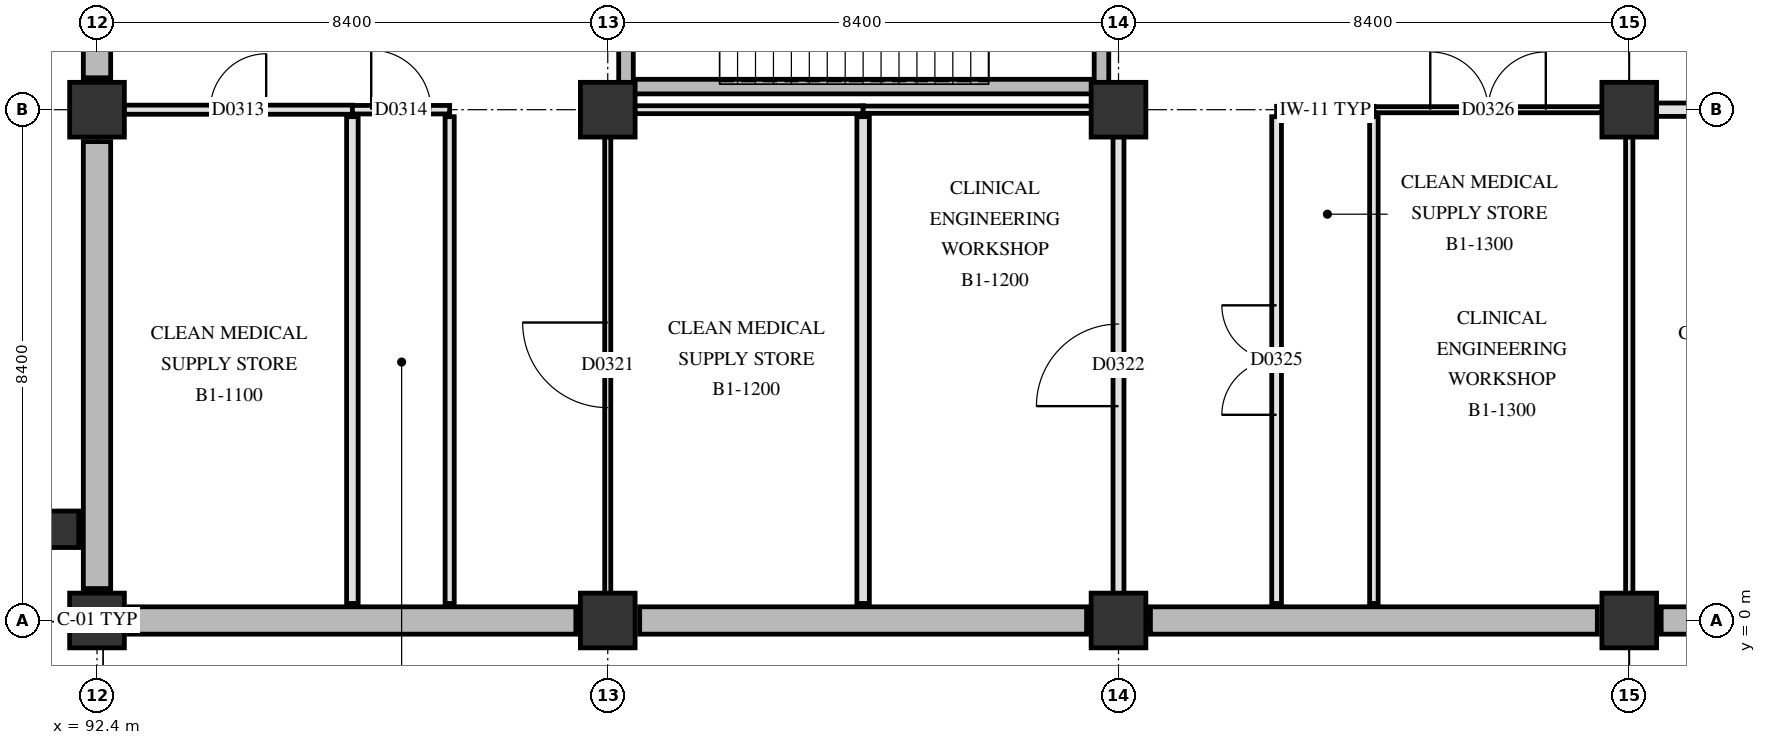
"""IFC4 building model, lengths in metres.
Left out: names, types, materials, properties, quantities, classifications, styles, units other than length and angle.
Written with IfcOpenShell. Run it as: python <this file> out.ifc"""

import sys

from ifc_helpers import new_model, si_unit, direction, frame, frame_2d, origin, origin_2d, place, context, subcontext, project, spatial, rectangle, extrude, element, fill, save


model = new_model("IFC4")
c1 = context("Model", 3, precision=1e-05, world=origin(), true_north=direction((0.0, 1.0)))
c2 = subcontext(c1, "Body", "Model", "MODEL_VIEW")
j1 = project(units=[si_unit("LENGTHUNIT", "METRE"), si_unit("PLANEANGLEUNIT", "RADIAN")], contexts=[c1])
p1 = place(None, origin())
s1 = spatial("IfcSite", under=j1, at=p1, CompositionType="ELEMENT")
p2 = place(p1, origin())
s2 = spatial("IfcBuilding", under=s1, at=p2, CompositionType="ELEMENT")
p3 = place(p2, frame((0.0, 0.0, -5.4)))
s3 = spatial("IfcBuildingStorey", under=s2, at=p3, CompositionType="ELEMENT", Elevation=-5.4)
for number, where, z_axis, x_axis in (
    (1, (92.4, 0.0, 0.0), (0.0, 0.0, 1.0), (1.0, 0.0, 0.0)),
    (2, (92.4, 8.4, 0.0), (0.0, 0.0, 1.0), (1.0, 0.0, 0.0)),
    (3, (100.8, 0.0, 0.0), (0.0, 0.0, 1.0), (1.0, 0.0, 0.0)),
    (4, (100.8, 8.4, 0.0), (0.0, 0.0, 1.0), (1.0, 0.0, 0.0)),
    (5, (109.2, 0.0, 0.0), (0.0, 0.0, 1.0), (1.0, 0.0, 0.0)),
    (6, (109.2, 8.4, 0.0), (0.0, 0.0, 1.0), (1.0, 0.0, 0.0)),
    (7, (117.6, 0.0, 0.0), (0.0, 0.0, 1.0), (1.0, 0.0, 0.0)),
    (8, (117.6, 8.4, 0.0), (0.0, 0.0, 1.0), (1.0, 0.0, 0.0)),
):
    element("IfcColumn", number, at=place(p3, frame(where, z_axis=z_axis, x_axis=x_axis)), inside=s3, PredefinedType="COLUMN", context=c2, shape_type="SweptSolid", body=[
        extrude(rectangle(XDim=0.9, YDim=0.9, at=origin_2d()), origin(), (0.0, 0.0, 1.0), 5.4),
    ])
p4 = place(p3, frame((125.475, 0.0, 0.0), z_axis=(0.0, 0.0, 1.0), x_axis=(-1.0, 0.0, 0.0)))
e9 = element("IfcWall", 9, at=p4, inside=s3, PredefinedType="SOLIDWALL", context=c2, shape_type="SweptSolid", body=[
    extrude(rectangle(XDim=7.35, YDim=0.45, at=frame_2d((3.675, 0.0))), origin(), (0.0, 0.0, 1.0), 5.08),
])
p5 = place(p3, frame((117.075, 0.0, 0.0), z_axis=(0.0, 0.0, 1.0), x_axis=(-1.0, 0.0, 0.0)))
e10 = element("IfcWall", 10, at=p5, inside=s3, PredefinedType="SOLIDWALL", context=c2, shape_type="SweptSolid", body=[
    extrude(rectangle(XDim=7.35, YDim=0.45, at=frame_2d((3.675, 0.0))), origin(), (0.0, 0.0, 1.0), 5.08),
])
p6 = place(p3, frame((108.675, 0.0, 0.0), z_axis=(0.0, 0.0, 1.0), x_axis=(-1.0, 0.0, 0.0)))
e11 = element("IfcWall", 11, at=p6, inside=s3, PredefinedType="SOLIDWALL", context=c2, shape_type="SweptSolid", body=[
    extrude(rectangle(XDim=7.35, YDim=0.45, at=frame_2d((3.675, 0.0))), origin(), (0.0, 0.0, 1.0), 5.08),
])
p7 = place(p3, frame((100.275, 0.0, 0.0), z_axis=(0.0, 0.0, 1.0), x_axis=(-1.0, 0.0, 0.0)))
e12 = element("IfcWall", 12, at=p7, inside=s3, PredefinedType="SOLIDWALL", context=c2, shape_type="SweptSolid", body=[
    extrude(rectangle(XDim=7.35, YDim=0.45, at=frame_2d((3.675, 0.0))), origin(), (0.0, 0.0, 1.0), 5.08),
])
p8 = place(p3, frame((92.4, 0.525, 0.0), z_axis=(0.0, 0.0, 1.0), x_axis=(0.0, 1.0, 0.0)))
e13 = element("IfcWall", 13, at=p8, inside=s3, PredefinedType="SOLIDWALL", context=c2, shape_type="SweptSolid", body=[
    extrude(rectangle(XDim=7.35, YDim=0.45, at=frame_2d((3.675, 0.0))), origin(), (0.0, 0.0, 1.0), 5.08),
])
p9 = place(p3, frame((92.4, 8.925, 0.0), z_axis=(0.0, 0.0, 1.0), x_axis=(0.0, 1.0, 0.0)))
e14 = element("IfcWall", 14, at=p9, inside=s3, PredefinedType="SOLIDWALL", context=c2, shape_type="SweptSolid", body=[
    extrude(rectangle(XDim=7.35, YDim=0.45, at=frame_2d((3.675, 0.0))), origin(), (0.0, 0.0, 1.0), 5.08),
])
p10 = place(p3, frame((91.8, 1.5, 0.0), z_axis=(0.0, 0.0, 1.0), x_axis=(1.0, 0.0, 0.0)))
e15 = element("IfcColumn", 15, at=p10, inside=s3, PredefinedType="COLUMN", context=c2, shape_type="SweptSolid", body=[
    extrude(rectangle(XDim=0.6, YDim=0.6, at=origin_2d()), origin(), (0.0, 0.0, 1.0), 4.0),
])
p11 = place(p3, frame((101.1, 8.78, 0.0), z_axis=(0.0, 0.0, 1.0), x_axis=(1.0, 0.0, 0.0)))
e16 = element("IfcWall", 16, at=p11, inside=s3, PredefinedType="SHEAR", context=c2, shape_type="SweptSolid", body=[
    extrude(rectangle(XDim=7.82, YDim=0.24, at=frame_2d((3.91, 0.0))), origin(), (0.0, 0.0, 1.0), 5.08),
])
for number, where, z_axis, x_axis in (
    (17, (101.1, 8.78, 0.0), (0.0, 0.0, 1.0), (0.0, 1.0, 0.0)),
    (18, (108.92, 8.78, 0.0), (0.0, 0.0, 1.0), (0.0, 1.0, 0.0)),
):
    element("IfcWall", number, at=place(p3, frame(where, z_axis=z_axis, x_axis=x_axis)), inside=s3, PredefinedType="SHEAR", context=c2, shape_type="SweptSolid", body=[
        extrude(rectangle(XDim=3.32, YDim=0.24, at=frame_2d((1.66, 0.0))), origin(), (0.0, 0.0, 1.0), 5.08),
    ])
p12 = place(p3, frame((92.845, 8.4, 0.0), z_axis=(0.0, 0.0, 1.0), x_axis=(1.0, 0.0, 0.0)))
e19 = element("IfcWall", 19, at=p12, inside=s3, PredefinedType="PARTITIONING", context=c2, shape_type="SweptSolid", body=[
    extrude(rectangle(XDim=3.755, YDim=0.15, at=frame_2d((1.877, 0.0))), origin(), (0.0, 0.0, 1.0), 4.42),
])
p13 = place(p12, frame((1.417, 0.0, 0.0)))
e20 = element("IfcOpeningElement", 20, at=p13, cuts=e19, PredefinedType="OPENING", context=c2, shape_type="SweptSolid", body=[
    extrude(rectangle(XDim=0.92, YDim=2.08, at=frame_2d((0.46, 1.04))), frame((0.0, 0.085, 0.0), z_axis=(0.0, -1.0, 0.0), x_axis=(1.0, 0.0, 0.0)), (0.0, 0.0, 1.0), 0.17),
])
p14 = place(p3, frame((96.6, 8.4, 0.0), z_axis=(0.0, 0.0, 1.0), x_axis=(1.0, 0.0, 0.0)))
e21 = element("IfcWall", 21, at=p14, inside=s3, PredefinedType="PARTITIONING", context=c2, shape_type="SweptSolid", body=[
    extrude(rectangle(XDim=1.6, YDim=0.14, at=frame_2d((0.8, 0.0))), origin(), (0.0, 0.0, 1.0), 4.42),
])
p15 = place(p14, frame((0.31, 0.0, 0.0)))
e22 = element("IfcOpeningElement", 22, at=p15, cuts=e21, PredefinedType="OPENING", context=c2, shape_type="SweptSolid", body=[
    extrude(rectangle(XDim=0.98, YDim=2.12, at=frame_2d((0.49, 1.06))), frame((0.0, 0.08, 0.0), z_axis=(0.0, -1.0, 0.0), x_axis=(1.0, 0.0, 0.0)), (0.0, 0.0, 1.0), 0.16),
])
p16 = place(p3, frame((101.245, 8.4, 0.0), z_axis=(0.0, 0.0, 1.0), x_axis=(1.0, 0.0, 0.0)))
e23 = element("IfcWall", 23, at=p16, inside=s3, PredefinedType="PARTITIONING", context=c2, shape_type="SweptSolid", body=[
    extrude(rectangle(XDim=3.755, YDim=0.13, at=frame_2d((1.877, 0.0))), origin(), (0.0, 0.0, 1.0), 4.42),
])
p17 = place(p3, frame((105.0, 8.4, 0.0), z_axis=(0.0, 0.0, 1.0), x_axis=(1.0, 0.0, 0.0)))
e24 = element("IfcWall", 24, at=p17, inside=s3, PredefinedType="PARTITIONING", context=c2, shape_type="SweptSolid", body=[
    extrude(rectangle(XDim=3.755, YDim=0.12, at=frame_2d((1.877, 0.0))), origin(), (0.0, 0.0, 1.0), 4.42),
])
p18 = place(p3, frame((111.8, 8.4, 0.0), z_axis=(0.0, 0.0, 1.0), x_axis=(1.0, 0.0, 0.0)))
e25 = element("IfcWall", 25, at=p18, inside=s3, PredefinedType="PARTITIONING", context=c2, shape_type="SweptSolid", body=[
    extrude(rectangle(XDim=1.6, YDim=0.112, at=frame_2d((0.8, 0.0))), origin(), (0.0, 0.0, 1.0), 4.42),
])
p19 = place(p3, frame((113.4, 8.4, 0.0), z_axis=(0.0, 0.0, 1.0), x_axis=(1.0, 0.0, 0.0)))
e26 = element("IfcWall", 26, at=p19, inside=s3, PredefinedType="PARTITIONING", context=c2, shape_type="SweptSolid", body=[
    extrude(rectangle(XDim=3.755, YDim=0.1, at=frame_2d((1.877, 0.0))), origin(), (0.0, 0.0, 1.0), 4.42),
])
p20 = place(p19, frame((0.927, 0.0, 0.0)))
e27 = element("IfcOpeningElement", 27, at=p20, cuts=e26, PredefinedType="OPENING", context=c2, shape_type="SweptSolid", body=[
    extrude(rectangle(XDim=1.9, YDim=2.3, at=frame_2d((0.95, 1.15))), frame((0.0, 0.06, 0.0), z_axis=(0.0, -1.0, 0.0), x_axis=(1.0, 0.0, 0.0)), (0.0, 0.0, 1.0), 0.12),
])
p21 = place(p3, frame((118.045, 8.4, 0.0), z_axis=(0.0, 0.0, 1.0), x_axis=(1.0, 0.0, 0.0)))
e28 = element("IfcWall", 28, at=p21, inside=s3, PredefinedType="PARTITIONING", context=c2, shape_type="SweptSolid", body=[
    extrude(rectangle(XDim=3.755, YDim=0.22, at=frame_2d((1.877, 0.0))), origin(), (0.0, 0.0, 1.0), 4.42),
])
p22 = place(p21, frame((1.353, 0.0, 0.0)))
e29 = element("IfcOpeningElement", 29, at=p22, cuts=e28, PredefinedType="OPENING", context=c2, shape_type="SweptSolid", body=[
    extrude(rectangle(XDim=1.05, YDim=2.15, at=frame_2d((0.525, 1.075))), frame((0.0, 0.12, 0.0), z_axis=(0.0, -1.0, 0.0), x_axis=(1.0, 0.0, 0.0)), (0.0, 0.0, 1.0), 0.24),
])
p23 = place(p3, frame((96.6, 0.28, 0.0), z_axis=(0.0, 0.0, 1.0), x_axis=(0.0, 1.0, 0.0)))
e30 = element("IfcWall", 30, at=p23, inside=s3, PredefinedType="PARTITIONING", context=c2, shape_type="SweptSolid", body=[
    extrude(rectangle(XDim=8.005, YDim=0.19, at=frame_2d((4.002, 0.0))), origin(), (0.0, 0.0, 1.0), 4.42),
])
p24 = place(p3, frame((98.2, 0.28, 0.0), z_axis=(0.0, 0.0, 1.0), x_axis=(0.0, 1.0, 0.0)))
e31 = element("IfcWall", 31, at=p24, inside=s3, PredefinedType="PARTITIONING", context=c2, shape_type="SweptSolid", body=[
    extrude(rectangle(XDim=8.005, YDim=0.15, at=frame_2d((4.002, 0.0))), origin(), (0.0, 0.0, 1.0), 4.42),
])
p25 = place(p3, frame((100.8, 0.445, 0.0), z_axis=(0.0, 0.0, 1.0), x_axis=(0.0, 1.0, 0.0)))
e32 = element("IfcWall", 32, at=p25, inside=s3, PredefinedType="PARTITIONING", context=c2, shape_type="SweptSolid", body=[
    extrude(rectangle(XDim=7.51, YDim=0.1, at=frame_2d((3.755, 0.0))), origin(), (0.0, 0.0, 1.0), 4.47),
])
p26 = place(p25, frame((3.055, 0.0, 0.0)))
e33 = element("IfcOpeningElement", 33, at=p26, cuts=e32, PredefinedType="OPENING", context=c2, shape_type="SweptSolid", body=[
    extrude(rectangle(XDim=1.4, YDim=2.2, at=frame_2d((0.7, 1.1))), frame((0.0, 0.06, 0.0), z_axis=(0.0, -1.0, 0.0), x_axis=(1.0, 0.0, 0.0)), (0.0, 0.0, 1.0), 0.12),
])
p27 = place(p3, frame((105.0, 0.28, 0.0), z_axis=(0.0, 0.0, 1.0), x_axis=(0.0, 1.0, 0.0)))
e34 = element("IfcWall", 34, at=p27, inside=s3, PredefinedType="PARTITIONING", context=c2, shape_type="SweptSolid", body=[
    extrude(rectangle(XDim=8.005, YDim=0.205, at=frame_2d((4.002, 0.0))), origin(), (0.0, 0.0, 1.0), 4.42),
])
p28 = place(p3, frame((109.2, 0.445, 0.0), z_axis=(0.0, 0.0, 1.0), x_axis=(0.0, 1.0, 0.0)))
e35 = element("IfcWall", 35, at=p28, inside=s3, PredefinedType="PARTITIONING", context=c2, shape_type="SweptSolid", body=[
    extrude(rectangle(XDim=7.51, YDim=0.18, at=frame_2d((3.755, 0.0))), origin(), (0.0, 0.0, 1.0), 4.47),
])
p29 = place(p28, frame((3.08, 0.0, 0.0)))
e36 = element("IfcOpeningElement", 36, at=p29, cuts=e35, PredefinedType="OPENING", context=c2, shape_type="SweptSolid", body=[
    extrude(rectangle(XDim=1.35, YDim=2.2, at=frame_2d((0.675, 1.1))), frame((0.0, 0.1, 0.0), z_axis=(0.0, -1.0, 0.0), x_axis=(1.0, 0.0, 0.0)), (0.0, 0.0, 1.0), 0.2),
])
p30 = place(p3, frame((111.8, 0.28, 0.0), z_axis=(0.0, 0.0, 1.0), x_axis=(0.0, 1.0, 0.0)))
e37 = element("IfcWall", 37, at=p30, inside=s3, PredefinedType="PARTITIONING", context=c2, shape_type="SweptSolid", body=[
    extrude(rectangle(XDim=8.005, YDim=0.16, at=frame_2d((4.002, 0.0))), origin(), (0.0, 0.0, 1.0), 4.42),
])
p31 = place(p30, frame((3.103, 0.0, 0.0)))
e38 = element("IfcOpeningElement", 38, at=p31, cuts=e37, PredefinedType="OPENING", context=c2, shape_type="SweptSolid", body=[
    extrude(rectangle(XDim=1.8, YDim=2.25, at=frame_2d((0.9, 1.125))), frame((0.0, 0.09, 0.0), z_axis=(0.0, -1.0, 0.0), x_axis=(1.0, 0.0, 0.0)), (0.0, 0.0, 1.0), 0.18),
])
p32 = place(p3, frame((113.4, 0.28, 0.0), z_axis=(0.0, 0.0, 1.0), x_axis=(0.0, 1.0, 0.0)))
e39 = element("IfcWall", 39, at=p32, inside=s3, PredefinedType="PARTITIONING", context=c2, shape_type="SweptSolid", body=[
    extrude(rectangle(XDim=8.005, YDim=0.14, at=frame_2d((4.002, 0.0))), origin(), (0.0, 0.0, 1.0), 4.42),
])
p33 = place(p3, frame((117.6, 0.445, 0.0), z_axis=(0.0, 0.0, 1.0), x_axis=(0.0, 1.0, 0.0)))
e40 = element("IfcWall", 40, at=p33, inside=s3, PredefinedType="PARTITIONING", context=c2, shape_type="SweptSolid", body=[
    extrude(rectangle(XDim=7.51, YDim=0.12, at=frame_2d((3.755, 0.0))), origin(), (0.0, 0.0, 1.0), 4.47),
])
p34 = place(p13, origin())
e41 = element("IfcDoor", 41, at=p34, inside=s3, OperationType="SINGLE_SWING_RIGHT", PredefinedType="DOOR", context=c2, shape_type="SweptSolid", body=[
    extrude(rectangle(XDim=0.92, YDim=2.08, at=frame_2d((0.46, 1.04))), frame((0.0, 0.025, 0.0), z_axis=(0.0, -1.0, 0.0), x_axis=(1.0, 0.0, 0.0)), (0.0, 0.0, 1.0), 0.05),
])
fill(e20, e41)
p35 = place(p15, origin())
e42 = element("IfcDoor", 42, at=p35, inside=s3, OperationType="SINGLE_SWING_LEFT", PredefinedType="DOOR", context=c2, shape_type="SweptSolid", body=[
    extrude(rectangle(XDim=0.98, YDim=2.12, at=frame_2d((0.49, 1.06))), frame((0.0, 0.025, 0.0), z_axis=(0.0, -1.0, 0.0), x_axis=(1.0, 0.0, 0.0)), (0.0, 0.0, 1.0), 0.05),
])
fill(e22, e42)
p36 = place(p26, origin())
e43 = element("IfcDoor", 43, at=p36, inside=s3, OperationType="SINGLE_SWING_RIGHT", PredefinedType="DOOR", context=c2, shape_type="SweptSolid", body=[
    extrude(rectangle(XDim=1.4, YDim=2.2, at=frame_2d((0.7, 1.1))), frame((0.0, 0.025, 0.0), z_axis=(0.0, -1.0, 0.0), x_axis=(1.0, 0.0, 0.0)), (0.0, 0.0, 1.0), 0.05),
])
fill(e33, e43)
p37 = place(p29, origin())
e44 = element("IfcDoor", 44, at=p37, inside=s3, OperationType="SINGLE_SWING_LEFT", PredefinedType="DOOR", context=c2, shape_type="SweptSolid", body=[
    extrude(rectangle(XDim=1.35, YDim=2.2, at=frame_2d((0.675, 1.1))), frame((0.0, 0.025, 0.0), z_axis=(0.0, -1.0, 0.0), x_axis=(1.0, 0.0, 0.0)), (0.0, 0.0, 1.0), 0.05),
])
fill(e36, e44)
p38 = place(p31, origin())
e45 = element("IfcDoor", 45, at=p38, inside=s3, OperationType="DOUBLE_SWING_RIGHT", PredefinedType="DOOR", context=c2, shape_type="SweptSolid", body=[
    extrude(rectangle(XDim=1.8, YDim=2.25, at=frame_2d((0.9, 1.125))), frame((0.0, 0.025, 0.0), z_axis=(0.0, -1.0, 0.0), x_axis=(1.0, 0.0, 0.0)), (0.0, 0.0, 1.0), 0.05),
])
fill(e38, e45)
p39 = place(p20, origin())
e46 = element("IfcDoor", 46, at=p39, inside=s3, OperationType="DOUBLE_SWING_LEFT", PredefinedType="DOOR", context=c2, shape_type="SweptSolid", body=[
    extrude(rectangle(XDim=1.9, YDim=2.3, at=frame_2d((0.95, 1.15))), frame((0.0, 0.025, 0.0), z_axis=(0.0, -1.0, 0.0), x_axis=(1.0, 0.0, 0.0)), (0.0, 0.0, 1.0), 0.05),
])
fill(e27, e46)
save(model, sys.argv[1])
